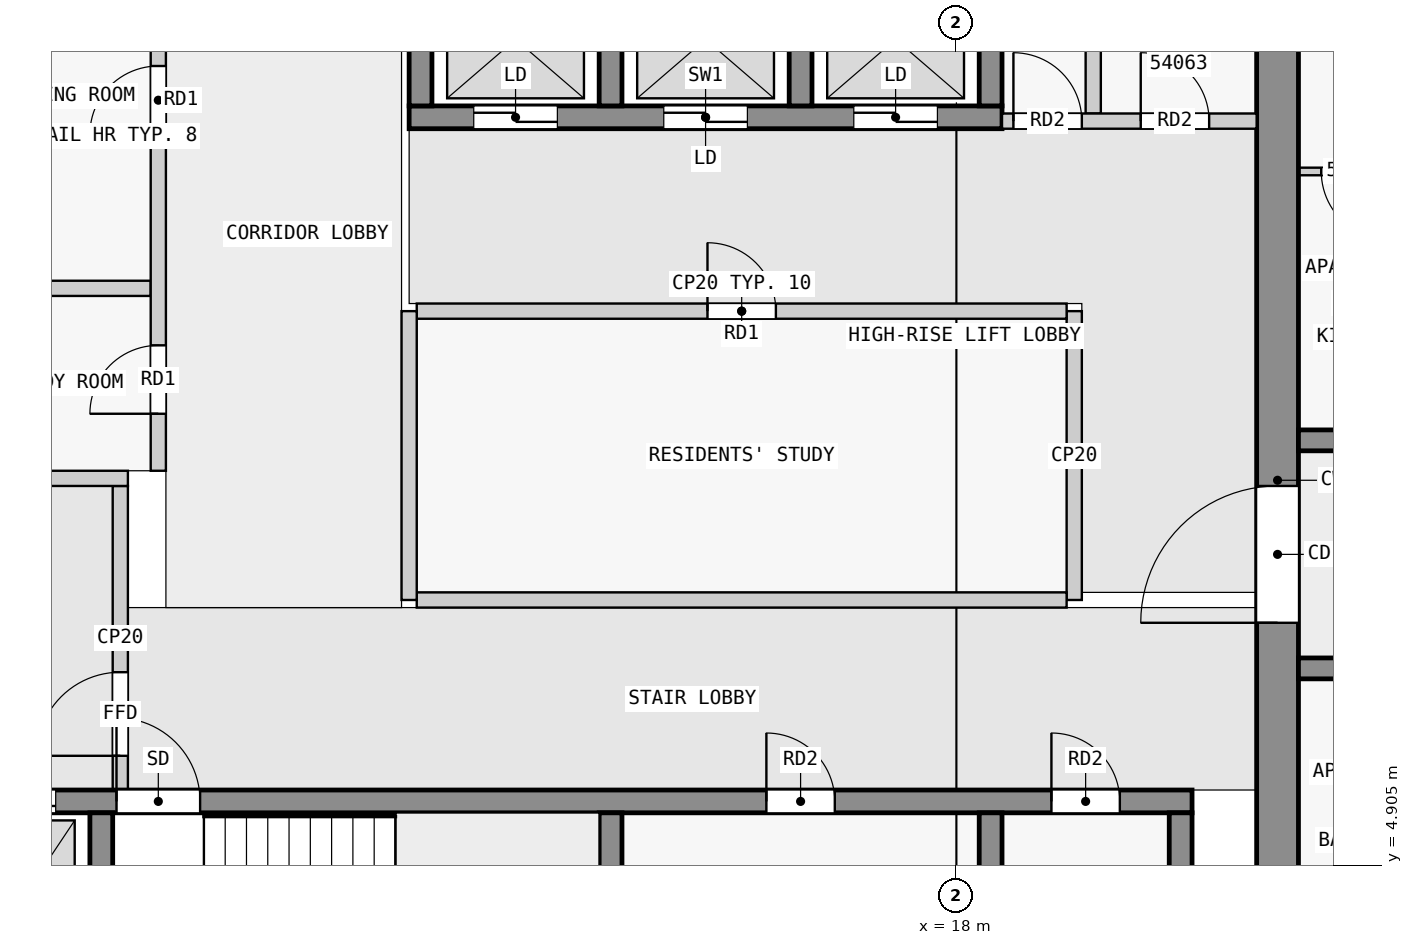
"""IFC4 building model, lengths in metres.
Left out: names, types, materials, properties, quantities, classifications, styles, units other than length and angle.
Written with IfcOpenShell. Run it as: python <this file> out.ifc"""

import sys

from ifc_helpers import new_model, si_unit, direction, frame, frame_2d, origin, place, context, subcontext, project, spatial, rectangle, extrude, element, fill, save


model = new_model("IFC4")
c1 = context("Model", 3, precision=1e-05, world=origin(), true_north=direction((0.0, 1.0)))
c2 = subcontext(c1, "Body", "Model", "MODEL_VIEW")
j1 = project(units=[si_unit("LENGTHUNIT", "METRE"), si_unit("PLANEANGLEUNIT", "RADIAN")], contexts=[c1])
p1 = place(None, origin())
s1 = spatial("IfcSite", under=j1, at=p1, CompositionType="ELEMENT")
p2 = place(p1, origin())
s2 = spatial("IfcBuilding", under=s1, at=p2, CompositionType="ELEMENT")
p3 = place(p2, frame((0.0, 0.0, 208.4)))
s3 = spatial("IfcBuildingStorey", under=s2, at=p3, CompositionType="ELEMENT", Elevation=208.4)
p4 = place(p3, frame((22.225, 2.5, 0.0), z_axis=(0.0, 0.0, 1.0), x_axis=(0.0, 1.0, 0.0)))
e1 = element("IfcWall", 1, at=p4, inside=s3, PredefinedType="SHEAR", context=c2, shape_type="SweptSolid", body=[
    extrude(rectangle(XDim=14.95, YDim=0.55, at=frame_2d((7.475, 0.0))), origin(), (0.0, 0.0, 1.0), 3.25),
])
p5 = place(p4, frame((5.6, 0.0, 0.0)))
e2 = element("IfcOpeningElement", 2, at=p5, cuts=e1, PredefinedType="OPENING", context=c2, shape_type="SweptSolid", body=[
    extrude(rectangle(XDim=1.8, YDim=2.1, at=frame_2d((0.9, 1.05))), frame((0.0, 0.285, 0.0), z_axis=(0.0, -1.0, 0.0), x_axis=(1.0, 0.0, 0.0)), (0.0, 0.0, 1.0), 0.57),
])
for number, where, z_axis, x_axis in (
    (3, (6.75, 2.8, 0.0), (0.0, 0.0, 1.0), (0.0, 1.0, 0.0)),
    (4, (13.45, 2.8, 0.0), (0.0, 0.0, 1.0), (0.0, 1.0, 0.0)),
    (5, (18.45, 2.8, 0.0), (0.0, 0.0, 1.0), (0.0, 1.0, 0.0)),
    (6, (20.95, 2.8, 0.0), (0.0, 0.0, 1.0), (0.0, 1.0, 0.0)),
):
    element("IfcWall", number, at=place(p3, frame(where, z_axis=z_axis, x_axis=x_axis)), inside=s3, PredefinedType="SHEAR", context=c2, shape_type="SweptSolid", body=[
        extrude(rectangle(XDim=2.8, YDim=0.3, at=frame_2d((1.4, 0.0))), origin(), (0.0, 0.0, 1.0), 3.25),
    ])
p6 = place(p3, frame((2.3, 5.75, 0.0), z_axis=(0.0, 0.0, 1.0), x_axis=(1.0, 0.0, 0.0)))
e7 = element("IfcWall", 7, at=p6, inside=s3, PredefinedType="SHEAR", context=c2, shape_type="SweptSolid", body=[
    extrude(rectangle(XDim=18.8, YDim=0.3, at=frame_2d((9.4, 0.0))), origin(), (0.0, 0.0, 1.0), 3.25),
])
p7 = place(p6, frame((4.65, 0.0, 0.0)))
e8 = element("IfcOpeningElement", 8, at=p7, cuts=e7, PredefinedType="OPENING", context=c2, shape_type="SweptSolid", body=[
    extrude(rectangle(XDim=1.1, YDim=2.1, at=frame_2d((0.55, 1.05))), frame((0.0, 0.16, 0.0), z_axis=(0.0, -1.0, 0.0), x_axis=(1.0, 0.0, 0.0)), (0.0, 0.0, 1.0), 0.32),
])
p8 = place(p6, frame((0.45, 0.0, 0.0)))
e9 = element("IfcOpeningElement", 9, at=p8, cuts=e7, PredefinedType="OPENING", context=c2, shape_type="SweptSolid", body=[
    extrude(rectangle(XDim=1.1, YDim=2.1, at=frame_2d((0.55, 1.05))), frame((0.0, 0.16, 0.0), z_axis=(0.0, -1.0, 0.0), x_axis=(1.0, 0.0, 0.0)), (0.0, 0.0, 1.0), 0.32),
])
p9 = place(p6, frame((2.75, 0.0, 0.0)))
e10 = element("IfcOpeningElement", 10, at=p9, cuts=e7, PredefinedType="OPENING", context=c2, shape_type="SweptSolid", body=[
    extrude(rectangle(XDim=1.1, YDim=2.1, at=frame_2d((0.55, 1.05))), frame((0.0, 0.16, 0.0), z_axis=(0.0, -1.0, 0.0), x_axis=(1.0, 0.0, 0.0)), (0.0, 0.0, 1.0), 0.32),
])
p10 = place(p6, frame((13.2, 0.0, 0.0)))
e11 = element("IfcOpeningElement", 11, at=p10, cuts=e7, PredefinedType="OPENING", context=c2, shape_type="SweptSolid", body=[
    extrude(rectangle(XDim=0.9, YDim=2.1, at=frame_2d((0.45, 1.05))), frame((0.0, 0.16, 0.0), z_axis=(0.0, -1.0, 0.0), x_axis=(1.0, 0.0, 0.0)), (0.0, 0.0, 1.0), 0.32),
])
p11 = place(p6, frame((16.95, 0.0, 0.0)))
e12 = element("IfcOpeningElement", 12, at=p11, cuts=e7, PredefinedType="OPENING", context=c2, shape_type="SweptSolid", body=[
    extrude(rectangle(XDim=0.9, YDim=2.1, at=frame_2d((0.45, 1.05))), frame((0.0, 0.16, 0.0), z_axis=(0.0, -1.0, 0.0), x_axis=(1.0, 0.0, 0.0)), (0.0, 0.0, 1.0), 0.32),
])
p12 = place(p3, frame((10.8, 14.75, 0.0), z_axis=(0.0, 0.0, 1.0), x_axis=(1.0, 0.0, 0.0)))
e13 = element("IfcWall", 13, at=p12, inside=s3, PredefinedType="SHEAR", context=c2, shape_type="SweptSolid", body=[
    extrude(rectangle(XDim=7.8, YDim=0.3, at=frame_2d((3.9, 0.0))), origin(), (0.0, 0.0, 1.0), 3.25),
])
p13 = place(p12, frame((0.85, 0.0, 0.0)))
e14 = element("IfcOpeningElement", 14, at=p13, cuts=e13, PredefinedType="OPENING", context=c2, shape_type="SweptSolid", body=[
    extrude(rectangle(XDim=1.1, YDim=2.1, at=frame_2d((0.55, 1.05))), frame((0.0, 0.16, 0.0), z_axis=(0.0, -1.0, 0.0), x_axis=(1.0, 0.0, 0.0)), (0.0, 0.0, 1.0), 0.32),
])
p14 = place(p12, frame((3.35, 0.0, 0.0)))
e15 = element("IfcOpeningElement", 15, at=p14, cuts=e13, PredefinedType="OPENING", context=c2, shape_type="SweptSolid", body=[
    extrude(rectangle(XDim=1.1, YDim=2.1, at=frame_2d((0.55, 1.05))), frame((0.0, 0.16, 0.0), z_axis=(0.0, -1.0, 0.0), x_axis=(1.0, 0.0, 0.0)), (0.0, 0.0, 1.0), 0.32),
])
p15 = place(p12, frame((5.85, 0.0, 0.0)))
e16 = element("IfcOpeningElement", 16, at=p15, cuts=e13, PredefinedType="OPENING", context=c2, shape_type="SweptSolid", body=[
    extrude(rectangle(XDim=1.1, YDim=2.1, at=frame_2d((0.55, 1.05))), frame((0.0, 0.16, 0.0), z_axis=(0.0, -1.0, 0.0), x_axis=(1.0, 0.0, 0.0)), (0.0, 0.0, 1.0), 0.32),
])
for number, where, z_axis, x_axis in (
    (17, (10.95, 14.9, 0.0), (0.0, 0.0, 1.0), (0.0, 1.0, 0.0)),
    (18, (13.45, 14.9, 0.0), (0.0, 0.0, 1.0), (0.0, 1.0, 0.0)),
    (19, (15.95, 14.9, 0.0), (0.0, 0.0, 1.0), (0.0, 1.0, 0.0)),
    (20, (18.45, 14.9, 0.0), (0.0, 0.0, 1.0), (0.0, 1.0, 0.0)),
):
    element("IfcWall", number, at=place(p3, frame(where, z_axis=z_axis, x_axis=x_axis)), inside=s3, PredefinedType="SHEAR", context=c2, shape_type="SweptSolid", body=[
        extrude(rectangle(XDim=2.0, YDim=0.3, at=frame_2d((1.0, 0.0))), origin(), (0.0, 0.0, 1.0), 3.25),
    ])
p16 = place(p3, frame((22.5, 7.5, 0.0), z_axis=(0.0, 0.0, 1.0), x_axis=(1.0, 0.0, 0.0)))
e21 = element("IfcWall", 21, at=p16, inside=s3, PredefinedType="SHEAR", context=c2, shape_type="SweptSolid", body=[
    extrude(rectangle(XDim=22.5, YDim=0.275, at=frame_2d((11.25, 0.0))), origin(), (0.0, 0.0, 1.0), 3.25),
])
p17 = place(p16, frame((4.05, 0.0, 0.0)))
e22 = element("IfcOpeningElement", 22, at=p17, cuts=e21, PredefinedType="OPENING", context=c2, shape_type="SweptSolid", body=[
    extrude(rectangle(XDim=1.0, YDim=2.1, at=frame_2d((0.5, 1.05))), frame((0.0, 0.147, 0.0), z_axis=(0.0, -1.0, 0.0), x_axis=(1.0, 0.0, 0.0)), (0.0, 0.0, 1.0), 0.295),
])
p18 = place(p16, frame((10.35, 0.0, 0.0)))
e23 = element("IfcOpeningElement", 23, at=p18, cuts=e21, PredefinedType="OPENING", context=c2, shape_type="SweptSolid", body=[
    extrude(rectangle(XDim=1.8, YDim=2.1, at=frame_2d((0.9, 1.05))), frame((0.0, 0.147, 0.0), z_axis=(0.0, -1.0, 0.0), x_axis=(1.0, 0.0, 0.0)), (0.0, 0.0, 1.0), 0.295),
])
p19 = place(p16, frame((16.85, 0.0, 0.0)))
e24 = element("IfcOpeningElement", 24, at=p19, cuts=e21, PredefinedType="OPENING", context=c2, shape_type="SweptSolid", body=[
    extrude(rectangle(XDim=1.0, YDim=2.1, at=frame_2d((0.5, 1.05))), frame((0.0, 0.147, 0.0), z_axis=(0.0, -1.0, 0.0), x_axis=(1.0, 0.0, 0.0)), (0.0, 0.0, 1.0), 0.295),
])
p20 = place(p3, frame((22.5, 10.5, 0.0), z_axis=(0.0, 0.0, 1.0), x_axis=(1.0, 0.0, 0.0)))
e25 = element("IfcWall", 25, at=p20, inside=s3, PredefinedType="SHEAR", context=c2, shape_type="SweptSolid", body=[
    extrude(rectangle(XDim=22.5, YDim=0.275, at=frame_2d((11.25, 0.0))), origin(), (0.0, 0.0, 1.0), 3.25),
])
p21 = place(p20, frame((7.75, 0.0, 0.0)))
e26 = element("IfcOpeningElement", 26, at=p21, cuts=e25, PredefinedType="OPENING", context=c2, shape_type="SweptSolid", body=[
    extrude(rectangle(XDim=1.0, YDim=2.1, at=frame_2d((0.5, 1.05))), frame((0.0, 0.147, 0.0), z_axis=(0.0, -1.0, 0.0), x_axis=(1.0, 0.0, 0.0)), (0.0, 0.0, 1.0), 0.295),
])
p22 = place(p20, frame((18.75, 0.0, 0.0)))
e27 = element("IfcOpeningElement", 27, at=p22, cuts=e25, PredefinedType="OPENING", context=c2, shape_type="SweptSolid", body=[
    extrude(rectangle(XDim=0.9, YDim=2.1, at=frame_2d((0.45, 1.05))), frame((0.0, 0.147, 0.0), z_axis=(0.0, -1.0, 0.0), x_axis=(1.0, 0.0, 0.0)), (0.0, 0.0, 1.0), 0.295),
])
p23 = place(p20, frame((20.95, 0.0, 0.0)))
e28 = element("IfcOpeningElement", 28, at=p23, cuts=e25, PredefinedType="OPENING", context=c2, shape_type="SweptSolid", body=[
    extrude(rectangle(XDim=1.0, YDim=2.1, at=frame_2d((0.5, 1.05))), frame((0.0, 0.147, 0.0), z_axis=(0.0, -1.0, 0.0), x_axis=(1.0, 0.0, 0.0)), (0.0, 0.0, 1.0), 0.295),
])
p24 = place(p3, frame((7.0, 5.9, 0.0), z_axis=(0.0, 0.0, 1.0), x_axis=(0.0, 1.0, 0.0)))
e29 = element("IfcWall", 29, at=p24, inside=s3, PredefinedType="PARTITIONING", context=c2, shape_type="SweptSolid", body=[
    extrude(rectangle(XDim=4.0, YDim=0.2, at=frame_2d((2.0, 0.0))), origin(), (0.0, 0.0, 1.0), 3.25),
])
p25 = place(p24, frame((0.45, 0.0, 0.0)))
e30 = element("IfcOpeningElement", 30, at=p25, cuts=e29, PredefinedType="OPENING", context=c2, shape_type="SweptSolid", body=[
    extrude(rectangle(XDim=1.1, YDim=2.1, at=frame_2d((0.55, 1.05))), frame((0.0, 0.11, 0.0), z_axis=(0.0, -1.0, 0.0), x_axis=(1.0, 0.0, 0.0)), (0.0, 0.0, 1.0), 0.22),
])
p26 = place(p3, frame((5.15, 10.0, 0.0), z_axis=(0.0, 0.0, 1.0), x_axis=(1.0, 0.0, 0.0)))
e31 = element("IfcWall", 31, at=p26, inside=s3, PredefinedType="PARTITIONING", context=c2, shape_type="SweptSolid", body=[
    extrude(rectangle(XDim=1.95, YDim=0.2, at=frame_2d((0.975, 0.0))), origin(), (0.0, 0.0, 1.0), 3.25),
])
p27 = place(p3, frame((10.8, 8.4, 0.0), z_axis=(0.0, 0.0, 1.0), x_axis=(0.0, 1.0, 0.0)))
e32 = element("IfcWall", 32, at=p27, inside=s3, PredefinedType="PARTITIONING", context=c2, shape_type="SweptSolid", body=[
    extrude(rectangle(XDim=3.8, YDim=0.2, at=frame_2d((1.9, 0.0))), origin(), (0.0, 0.0, 1.0), 3.25),
])
p28 = place(p3, frame((10.9, 8.4, 0.0), z_axis=(0.0, 0.0, 1.0), x_axis=(1.0, 0.0, 0.0)))
e33 = element("IfcWall", 33, at=p28, inside=s3, PredefinedType="PARTITIONING", context=c2, shape_type="SweptSolid", body=[
    extrude(rectangle(XDim=8.55, YDim=0.2, at=frame_2d((4.275, 0.0))), origin(), (0.0, 0.0, 1.0), 3.25),
])
p29 = place(p3, frame((19.55, 8.4, 0.0), z_axis=(0.0, 0.0, 1.0), x_axis=(0.0, 1.0, 0.0)))
e34 = element("IfcWall", 34, at=p29, inside=s3, PredefinedType="PARTITIONING", context=c2, shape_type="SweptSolid", body=[
    extrude(rectangle(XDim=3.8, YDim=0.2, at=frame_2d((1.9, 0.0))), origin(), (0.0, 0.0, 1.0), 3.25),
])
p30 = place(p3, frame((10.9, 12.2, 0.0), z_axis=(0.0, 0.0, 1.0), x_axis=(1.0, 0.0, 0.0)))
e35 = element("IfcWall", 35, at=p30, inside=s3, PredefinedType="PARTITIONING", context=c2, shape_type="SweptSolid", body=[
    extrude(rectangle(XDim=8.55, YDim=0.2, at=frame_2d((4.275, 0.0))), origin(), (0.0, 0.0, 1.0), 3.25),
])
p31 = place(p30, frame((3.825, 0.0, 0.0)))
e36 = element("IfcOpeningElement", 36, at=p31, cuts=e35, PredefinedType="OPENING", context=c2, shape_type="SweptSolid", body=[
    extrude(rectangle(XDim=0.9, YDim=2.1, at=frame_2d((0.45, 1.05))), frame((0.0, 0.11, 0.0), z_axis=(0.0, -1.0, 0.0), x_axis=(1.0, 0.0, 0.0)), (0.0, 0.0, 1.0), 0.22),
])
p32 = place(p3, frame((7.5, 10.1, 0.0), z_axis=(0.0, 0.0, 1.0), x_axis=(0.0, 1.0, 0.0)))
e37 = element("IfcWall", 37, at=p32, inside=s3, PredefinedType="PARTITIONING", context=c2, shape_type="SweptSolid", body=[
    extrude(rectangle(XDim=7.35, YDim=0.2, at=frame_2d((3.675, 0.0))), origin(), (0.0, 0.0, 1.0), 3.25),
])
p33 = place(p32, frame((0.75, 0.0, 0.0)))
e38 = element("IfcOpeningElement", 38, at=p33, cuts=e37, PredefinedType="OPENING", context=c2, shape_type="SweptSolid", body=[
    extrude(rectangle(XDim=0.9, YDim=2.1, at=frame_2d((0.45, 1.05))), frame((0.0, 0.11, 0.0), z_axis=(0.0, -1.0, 0.0), x_axis=(1.0, 0.0, 0.0)), (0.0, 0.0, 1.0), 0.22),
])
p34 = place(p32, frame((4.425, 0.0, 0.0)))
e39 = element("IfcOpeningElement", 39, at=p34, cuts=e37, PredefinedType="OPENING", context=c2, shape_type="SweptSolid", body=[
    extrude(rectangle(XDim=0.9, YDim=2.1, at=frame_2d((0.45, 1.05))), frame((0.0, 0.11, 0.0), z_axis=(0.0, -1.0, 0.0), x_axis=(1.0, 0.0, 0.0)), (0.0, 0.0, 1.0), 0.22),
])
p35 = place(p3, frame((5.15, 12.5, 0.0), z_axis=(0.0, 0.0, 1.0), x_axis=(1.0, 0.0, 0.0)))
e40 = element("IfcWall", 40, at=p35, inside=s3, PredefinedType="PARTITIONING", context=c2, shape_type="SweptSolid", body=[
    extrude(rectangle(XDim=2.25, YDim=0.2, at=frame_2d((1.125, 0.0))), origin(), (0.0, 0.0, 1.0), 3.25),
])
p36 = place(p3, frame((18.6, 14.7, 0.0), z_axis=(0.0, 0.0, 1.0), x_axis=(1.0, 0.0, 0.0)))
e41 = element("IfcWall", 41, at=p36, inside=s3, PredefinedType="PARTITIONING", context=c2, shape_type="SweptSolid", body=[
    extrude(rectangle(XDim=3.35, YDim=0.2, at=frame_2d((1.675, 0.0))), origin(), (0.0, 0.0, 1.0), 3.25),
])
p37 = place(p36, frame((0.15, 0.0, 0.0)))
e42 = element("IfcOpeningElement", 42, at=p37, cuts=e41, PredefinedType="OPENING", context=c2, shape_type="SweptSolid", body=[
    extrude(rectangle(XDim=0.9, YDim=2.1, at=frame_2d((0.45, 1.05))), frame((0.0, 0.11, 0.0), z_axis=(0.0, -1.0, 0.0), x_axis=(1.0, 0.0, 0.0)), (0.0, 0.0, 1.0), 0.22),
])
p38 = place(p36, frame((1.825, 0.0, 0.0)))
e43 = element("IfcOpeningElement", 43, at=p38, cuts=e41, PredefinedType="OPENING", context=c2, shape_type="SweptSolid", body=[
    extrude(rectangle(XDim=0.9, YDim=2.1, at=frame_2d((0.45, 1.05))), frame((0.0, 0.11, 0.0), z_axis=(0.0, -1.0, 0.0), x_axis=(1.0, 0.0, 0.0)), (0.0, 0.0, 1.0), 0.22),
])
p39 = place(p3, frame((19.8, 14.8, 0.0), z_axis=(0.0, 0.0, 1.0), x_axis=(0.0, 1.0, 0.0)))
e44 = element("IfcWall", 44, at=p39, inside=s3, PredefinedType="PARTITIONING", context=c2, shape_type="SweptSolid", body=[
    extrude(rectangle(XDim=2.65, YDim=0.2, at=frame_2d((1.325, 0.0))), origin(), (0.0, 0.0, 1.0), 3.25),
])
p40 = place(p3, frame((24.05, 14.038, 0.0), z_axis=(0.0, 0.0, 1.0), x_axis=(-1.0, 0.0, 0.0)))
e45 = element("IfcWall", 45, at=p40, inside=s3, PredefinedType="PARTITIONING", context=c2, shape_type="SweptSolid", body=[
    extrude(rectangle(XDim=1.55, YDim=0.1, at=frame_2d((0.775, 0.0))), origin(), (0.0, 0.0, 1.0), 3.25),
])
p41 = place(p40, frame((0.35, 0.0, 0.0)))
e46 = element("IfcOpeningElement", 46, at=p41, cuts=e45, PredefinedType="OPENING", context=c2, shape_type="SweptSolid", body=[
    extrude(rectangle(XDim=0.9, YDim=2.1, at=frame_2d((0.45, 1.05))), frame((0.0, 0.06, 0.0), z_axis=(0.0, -1.0, 0.0), x_axis=(1.0, 0.0, 0.0)), (0.0, 0.0, 1.0), 0.12),
])
p42 = place(p25, origin())
e47 = element("IfcDoor", 47, at=p42, inside=s3, OperationType="SINGLE_SWING_LEFT", PredefinedType="DOOR", context=c2, shape_type="SweptSolid", body=[
    extrude(rectangle(XDim=1.1, YDim=2.1, at=frame_2d((0.55, 1.05))), frame((0.0, 0.025, 0.0), z_axis=(0.0, -1.0, 0.0), x_axis=(1.0, 0.0, 0.0)), (0.0, 0.0, 1.0), 0.05),
])
fill(e30, e47)
p43 = place(p31, origin())
e48 = element("IfcDoor", 48, at=p43, inside=s3, OperationType="SINGLE_SWING_LEFT", PredefinedType="DOOR", context=c2, shape_type="SweptSolid", body=[
    extrude(rectangle(XDim=0.9, YDim=2.1, at=frame_2d((0.45, 1.05))), frame((0.0, 0.025, 0.0), z_axis=(0.0, -1.0, 0.0), x_axis=(1.0, 0.0, 0.0)), (0.0, 0.0, 1.0), 0.05),
])
fill(e36, e48)
p44 = place(p7, origin())
e49 = element("IfcDoor", 49, at=p44, inside=s3, OperationType="SINGLE_SWING_LEFT", PredefinedType="DOOR", context=c2, shape_type="SweptSolid", body=[
    extrude(rectangle(XDim=1.1, YDim=2.1, at=frame_2d((0.55, 1.05))), frame((0.0, 0.025, 0.0), z_axis=(0.0, -1.0, 0.0), x_axis=(1.0, 0.0, 0.0)), (0.0, 0.0, 1.0), 0.05),
])
fill(e8, e49)
p45 = place(p9, origin())
e50 = element("IfcDoor", 50, at=p45, inside=s3, OperationType="DOUBLE_DOOR_SLIDING", PredefinedType="DOOR", context=c2, shape_type="SweptSolid", body=[
    extrude(rectangle(XDim=1.1, YDim=2.1, at=frame_2d((0.55, 1.05))), frame((0.0, 0.025, 0.0), z_axis=(0.0, -1.0, 0.0), x_axis=(1.0, 0.0, 0.0)), (0.0, 0.0, 1.0), 0.05),
])
fill(e10, e50)
p46 = place(p13, origin())
e51 = element("IfcDoor", 51, at=p46, inside=s3, OperationType="DOUBLE_DOOR_SLIDING", PredefinedType="DOOR", context=c2, shape_type="SweptSolid", body=[
    extrude(rectangle(XDim=1.1, YDim=2.1, at=frame_2d((0.55, 1.05))), frame((0.0, 0.025, 0.0), z_axis=(0.0, -1.0, 0.0), x_axis=(1.0, 0.0, 0.0)), (0.0, 0.0, 1.0), 0.05),
])
fill(e14, e51)
p47 = place(p14, origin())
e52 = element("IfcDoor", 52, at=p47, inside=s3, OperationType="DOUBLE_DOOR_SLIDING", PredefinedType="DOOR", context=c2, shape_type="SweptSolid", body=[
    extrude(rectangle(XDim=1.1, YDim=2.1, at=frame_2d((0.55, 1.05))), frame((0.0, 0.025, 0.0), z_axis=(0.0, -1.0, 0.0), x_axis=(1.0, 0.0, 0.0)), (0.0, 0.0, 1.0), 0.05),
])
fill(e15, e52)
p48 = place(p15, origin())
e53 = element("IfcDoor", 53, at=p48, inside=s3, OperationType="DOUBLE_DOOR_SLIDING", PredefinedType="DOOR", context=c2, shape_type="SweptSolid", body=[
    extrude(rectangle(XDim=1.1, YDim=2.1, at=frame_2d((0.55, 1.05))), frame((0.0, 0.025, 0.0), z_axis=(0.0, -1.0, 0.0), x_axis=(1.0, 0.0, 0.0)), (0.0, 0.0, 1.0), 0.05),
])
fill(e16, e53)
p49 = place(p5, origin())
e54 = element("IfcDoor", 54, at=p49, inside=s3, OperationType="DOUBLE_DOOR_SINGLE_SWING", PredefinedType="DOOR", context=c2, shape_type="SweptSolid", body=[
    extrude(rectangle(XDim=1.8, YDim=2.1, at=frame_2d((0.9, 1.05))), frame((0.0, 0.025, 0.0), z_axis=(0.0, -1.0, 0.0), x_axis=(1.0, 0.0, 0.0)), (0.0, 0.0, 1.0), 0.05),
])
fill(e2, e54)
p50 = place(p33, origin())
e55 = element("IfcDoor", 55, at=p50, inside=s3, OperationType="SINGLE_SWING_RIGHT", PredefinedType="DOOR", context=c2, shape_type="SweptSolid", body=[
    extrude(rectangle(XDim=0.9, YDim=2.1, at=frame_2d((0.45, 1.05))), frame((0.0, 0.025, 0.0), z_axis=(0.0, -1.0, 0.0), x_axis=(1.0, 0.0, 0.0)), (0.0, 0.0, 1.0), 0.05),
])
fill(e38, e55)
p51 = place(p34, origin())
e56 = element("IfcDoor", 56, at=p51, inside=s3, OperationType="SINGLE_SWING_RIGHT", PredefinedType="DOOR", context=c2, shape_type="SweptSolid", body=[
    extrude(rectangle(XDim=0.9, YDim=2.1, at=frame_2d((0.45, 1.05))), frame((0.0, 0.025, 0.0), z_axis=(0.0, -1.0, 0.0), x_axis=(1.0, 0.0, 0.0)), (0.0, 0.0, 1.0), 0.05),
])
fill(e39, e56)
p52 = place(p37, origin())
e57 = element("IfcDoor", 57, at=p52, inside=s3, OperationType="SINGLE_SWING_LEFT", PredefinedType="DOOR", context=c2, shape_type="SweptSolid", body=[
    extrude(rectangle(XDim=0.9, YDim=2.1, at=frame_2d((0.45, 1.05))), frame((0.0, 0.025, 0.0), z_axis=(0.0, -1.0, 0.0), x_axis=(1.0, 0.0, 0.0)), (0.0, 0.0, 1.0), 0.05),
])
fill(e42, e57)
p53 = place(p38, origin())
e58 = element("IfcDoor", 58, at=p53, inside=s3, OperationType="SINGLE_SWING_LEFT", PredefinedType="DOOR", context=c2, shape_type="SweptSolid", body=[
    extrude(rectangle(XDim=0.9, YDim=2.1, at=frame_2d((0.45, 1.05))), frame((0.0, 0.025, 0.0), z_axis=(0.0, -1.0, 0.0), x_axis=(1.0, 0.0, 0.0)), (0.0, 0.0, 1.0), 0.05),
])
fill(e43, e58)
p54 = place(p10, origin())
e59 = element("IfcDoor", 59, at=p54, inside=s3, OperationType="SINGLE_SWING_LEFT", PredefinedType="DOOR", context=c2, shape_type="SweptSolid", body=[
    extrude(rectangle(XDim=0.9, YDim=2.1, at=frame_2d((0.45, 1.05))), frame((0.0, 0.025, 0.0), z_axis=(0.0, -1.0, 0.0), x_axis=(1.0, 0.0, 0.0)), (0.0, 0.0, 1.0), 0.05),
])
fill(e11, e59)
p55 = place(p11, origin())
e60 = element("IfcDoor", 60, at=p55, inside=s3, OperationType="SINGLE_SWING_LEFT", PredefinedType="DOOR", context=c2, shape_type="SweptSolid", body=[
    extrude(rectangle(XDim=0.9, YDim=2.1, at=frame_2d((0.45, 1.05))), frame((0.0, 0.025, 0.0), z_axis=(0.0, -1.0, 0.0), x_axis=(1.0, 0.0, 0.0)), (0.0, 0.0, 1.0), 0.05),
])
fill(e12, e60)
p56 = place(p41, origin())
e61 = element("IfcDoor", 61, at=p56, inside=s3, OperationType="SINGLE_SWING_RIGHT", PredefinedType="DOOR", context=c2, shape_type="SweptSolid", body=[
    extrude(rectangle(XDim=0.9, YDim=2.1, at=frame_2d((0.45, 1.05))), frame((0.0, 0.025, 0.0), z_axis=(0.0, -1.0, 0.0), x_axis=(1.0, 0.0, 0.0)), (0.0, 0.0, 1.0), 0.05),
])
fill(e46, e61)
save(model, sys.argv[1])
